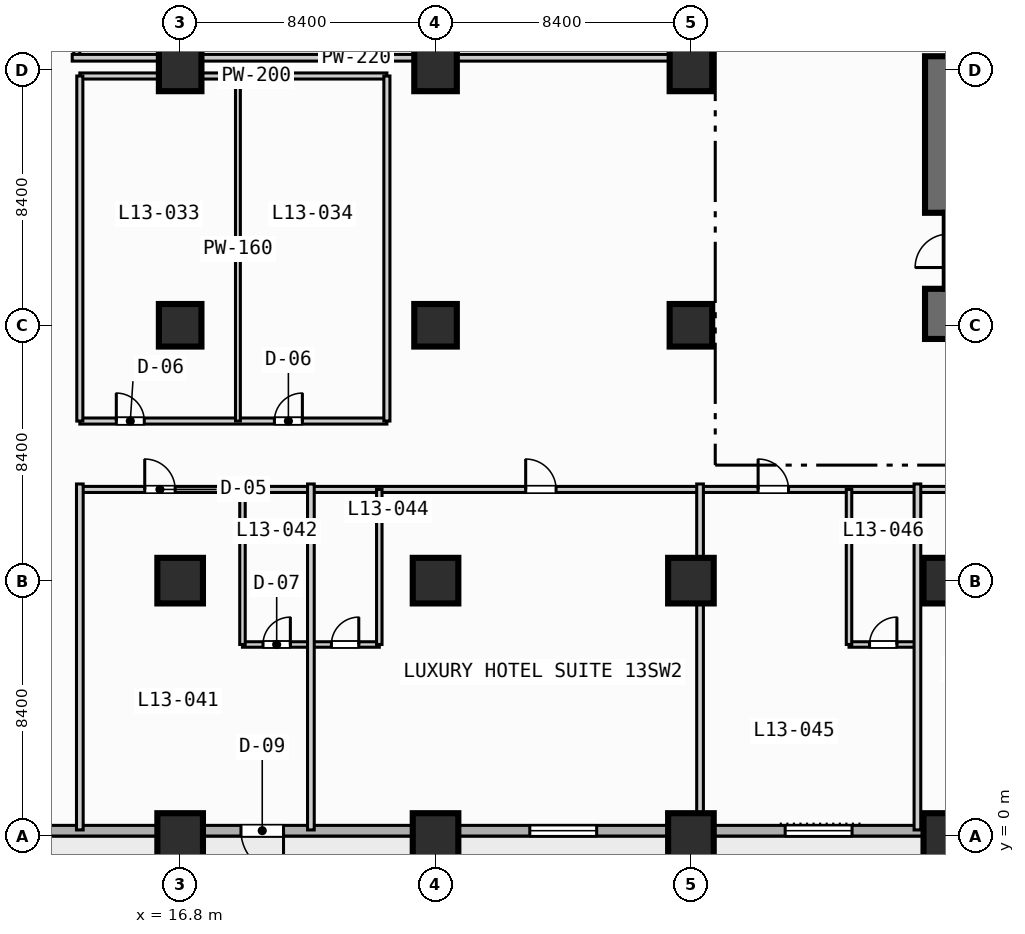
"""IFC4 building model, lengths in metres.
Left out: names, types, materials, properties, quantities, classifications, styles, units other than length and angle.
Written with IfcOpenShell. Run it as: python <this file> out.ifc"""

import sys

from ifc_helpers import new_model, si_unit, direction, frame, frame_2d, origin, origin_2d, place, context, subcontext, project, spatial, rectangle, extrude, element, fill, save


model = new_model("IFC4")
c1 = context("Model", 3, precision=1e-05, world=origin(), true_north=direction((0.0, 1.0)))
c2 = subcontext(c1, "Body", "Model", "MODEL_VIEW")
j1 = project(units=[si_unit("LENGTHUNIT", "METRE"), si_unit("PLANEANGLEUNIT", "RADIAN")], contexts=[c1])
p1 = place(None, origin())
s1 = spatial("IfcSite", under=j1, at=p1, CompositionType="ELEMENT")
p2 = place(p1, origin())
s2 = spatial("IfcBuilding", under=s1, at=p2, CompositionType="ELEMENT")
p3 = place(p2, frame((0.0, 0.0, 58.6)))
s3 = spatial("IfcBuildingStorey", under=s2, at=p3, CompositionType="ELEMENT", Elevation=58.6)
p4 = place(p3, frame((41.75, 16.35, 0.0), z_axis=(0.0, 0.0, 1.0), x_axis=(0.0, 1.0, 0.0)))
e1 = element("IfcWall", 1, at=p4, inside=s3, PredefinedType="SHEAR", context=c2, shape_type="SweptSolid", body=[
    extrude(rectangle(XDim=1.65, YDim=0.9, at=frame_2d((0.825, 0.0))), origin(), (0.0, 0.0, 1.0), 3.55),
])
p5 = place(p3, frame((41.75, 20.5, 0.0), z_axis=(0.0, 0.0, 1.0), x_axis=(0.0, 1.0, 0.0)))
e2 = element("IfcWall", 2, at=p5, inside=s3, PredefinedType="SHEAR", context=c2, shape_type="SweptSolid", body=[
    extrude(rectangle(XDim=5.15, YDim=0.9, at=frame_2d((2.575, 0.0))), origin(), (0.0, 0.0, 1.0), 3.55),
])
for number, where, z_axis, x_axis in (
    (3, (16.8, 0.0, 0.0), (0.0, 0.0, 1.0), (1.0, 0.0, 0.0)),
    (4, (16.8, 8.4, 0.0), (0.0, 0.0, 1.0), (1.0, 0.0, 0.0)),
):
    element("IfcColumn", number, at=place(p3, frame(where, z_axis=z_axis, x_axis=x_axis)), inside=s3, PredefinedType="COLUMN", context=c2, shape_type="SweptSolid", body=[
        extrude(rectangle(XDim=1.5, YDim=1.5, at=origin_2d()), origin(), (0.0, 0.0, 1.0), 3.8),
    ])
for number, where, z_axis, x_axis in (
    (5, (16.8, 16.8, 0.0), (0.0, 0.0, 1.0), (1.0, 0.0, 0.0)),
    (6, (16.8, 25.2, 0.0), (0.0, 0.0, 1.0), (1.0, 0.0, 0.0)),
):
    element("IfcColumn", number, at=place(p3, frame(where, z_axis=z_axis, x_axis=x_axis)), inside=s3, PredefinedType="COLUMN", context=c2, shape_type="SweptSolid", body=[
        extrude(rectangle(XDim=1.4, YDim=1.4, at=origin_2d()), origin(), (0.0, 0.0, 1.0), 3.8),
    ])
for number, where, z_axis, x_axis in (
    (7, (25.2, 0.0, 0.0), (0.0, 0.0, 1.0), (1.0, 0.0, 0.0)),
    (8, (25.2, 8.4, 0.0), (0.0, 0.0, 1.0), (1.0, 0.0, 0.0)),
):
    element("IfcColumn", number, at=place(p3, frame(where, z_axis=z_axis, x_axis=x_axis)), inside=s3, PredefinedType="COLUMN", context=c2, shape_type="SweptSolid", body=[
        extrude(rectangle(XDim=1.5, YDim=1.5, at=origin_2d()), origin(), (0.0, 0.0, 1.0), 3.8),
    ])
for number, where, z_axis, x_axis in (
    (9, (25.2, 16.8, 0.0), (0.0, 0.0, 1.0), (1.0, 0.0, 0.0)),
    (10, (25.2, 25.2, 0.0), (0.0, 0.0, 1.0), (1.0, 0.0, 0.0)),
):
    element("IfcColumn", number, at=place(p3, frame(where, z_axis=z_axis, x_axis=x_axis)), inside=s3, PredefinedType="COLUMN", context=c2, shape_type="SweptSolid", body=[
        extrude(rectangle(XDim=1.4, YDim=1.4, at=origin_2d()), origin(), (0.0, 0.0, 1.0), 3.8),
    ])
for number, where, z_axis, x_axis in (
    (11, (33.6, 0.0, 0.0), (0.0, 0.0, 1.0), (1.0, 0.0, 0.0)),
    (12, (33.6, 8.4, 0.0), (0.0, 0.0, 1.0), (1.0, 0.0, 0.0)),
):
    element("IfcColumn", number, at=place(p3, frame(where, z_axis=z_axis, x_axis=x_axis)), inside=s3, PredefinedType="COLUMN", context=c2, shape_type="SweptSolid", body=[
        extrude(rectangle(XDim=1.5, YDim=1.5, at=origin_2d()), origin(), (0.0, 0.0, 1.0), 3.8),
    ])
for number, where, z_axis, x_axis in (
    (13, (33.6, 16.8, 0.0), (0.0, 0.0, 1.0), (1.0, 0.0, 0.0)),
    (14, (33.6, 25.2, 0.0), (0.0, 0.0, 1.0), (1.0, 0.0, 0.0)),
):
    element("IfcColumn", number, at=place(p3, frame(where, z_axis=z_axis, x_axis=x_axis)), inside=s3, PredefinedType="COLUMN", context=c2, shape_type="SweptSolid", body=[
        extrude(rectangle(XDim=1.4, YDim=1.4, at=origin_2d()), origin(), (0.0, 0.0, 1.0), 3.8),
    ])
for number, where, z_axis, x_axis in (
    (15, (42.0, 0.0, 0.0), (0.0, 0.0, 1.0), (1.0, 0.0, 0.0)),
    (16, (42.0, 8.4, 0.0), (0.0, 0.0, 1.0), (1.0, 0.0, 0.0)),
):
    element("IfcColumn", number, at=place(p3, frame(where, z_axis=z_axis, x_axis=x_axis)), inside=s3, PredefinedType="COLUMN", context=c2, shape_type="SweptSolid", body=[
        extrude(rectangle(XDim=1.5, YDim=1.5, at=origin_2d()), origin(), (0.0, 0.0, 1.0), 3.8),
    ])
p6 = place(p3, frame((89.225, 0.175, 0.0), z_axis=(0.0, 0.0, 1.0), x_axis=(-1.0, 0.0, 0.0)))
e17 = element("IfcWall", 17, at=p6, inside=s3, PredefinedType="STANDARD", context=c2, shape_type="SweptSolid", body=[
    extrude(rectangle(XDim=86.05, YDim=0.35, at=frame_2d((43.025, 0.0))), origin(), (0.0, 0.0, 1.0), 3.55),
])
p7 = place(p6, frame((69.025, 0.0, 0.0)))
e18 = element("IfcOpeningElement", 18, at=p7, cuts=e17, PredefinedType="OPENING", context=c2, shape_type="SweptSolid", body=[
    extrude(rectangle(XDim=1.4, YDim=2.2, at=frame_2d((0.7, 1.1))), frame((0.0, 0.185, 0.0), z_axis=(0.0, -1.0, 0.0), x_axis=(1.0, 0.0, 0.0)), (0.0, 0.0, 1.0), 0.37),
])
p8 = place(p6, frame((58.725, 0.0, 0.85)))
e19 = element("IfcOpeningElement", 19, at=p8, cuts=e17, PredefinedType="OPENING", context=c2, shape_type="SweptSolid", body=[
    extrude(rectangle(XDim=2.2, YDim=1.8, at=frame_2d((1.1, 0.9))), frame((0.0, 0.185, 0.0), z_axis=(0.0, -1.0, 0.0), x_axis=(1.0, 0.0, 0.0)), (0.0, 0.0, 1.0), 0.37),
])
p9 = place(p6, frame((50.325, 0.0, 0.85)))
e20 = element("IfcOpeningElement", 20, at=p9, cuts=e17, PredefinedType="OPENING", context=c2, shape_type="SweptSolid", body=[
    extrude(rectangle(XDim=2.2, YDim=1.8, at=frame_2d((1.1, 0.9))), frame((0.0, 0.185, 0.0), z_axis=(0.0, -1.0, 0.0), x_axis=(1.0, 0.0, 0.0)), (0.0, 0.0, 1.0), 0.37),
])
p10 = place(p6, frame((41.925, 0.0, 0.85)))
e21 = element("IfcOpeningElement", 21, at=p10, cuts=e17, PredefinedType="OPENING", context=c2, shape_type="SweptSolid", body=[
    extrude(rectangle(XDim=2.2, YDim=1.8, at=frame_2d((1.1, 0.9))), frame((0.0, 0.185, 0.0), z_axis=(0.0, -1.0, 0.0), x_axis=(1.0, 0.0, 0.0)), (0.0, 0.0, 1.0), 0.37),
])
p11 = place(p6, frame((27.775, 0.0, 0.85)))
e22 = element("IfcOpeningElement", 22, at=p11, cuts=e17, PredefinedType="OPENING", context=c2, shape_type="SweptSolid", body=[
    extrude(rectangle(XDim=1.8, YDim=1.8, at=frame_2d((0.9, 0.9))), frame((0.0, 0.185, 0.0), z_axis=(0.0, -1.0, 0.0), x_axis=(1.0, 0.0, 0.0)), (0.0, 0.0, 1.0), 0.37),
])
p12 = place(p3, frame((42.075, 18.0, 0.0), z_axis=(0.0, 0.0, 1.0), x_axis=(0.0, 1.0, 0.0)))
e23 = element("IfcWall", 23, at=p12, inside=s3, PredefinedType="SOLIDWALL", context=c2, shape_type="SweptSolid", body=[
    extrude(rectangle(XDim=2.5, YDim=0.25, at=frame_2d((1.25, 0.0))), origin(), (0.0, 0.0, 1.0), 3.55),
])
p13 = place(p12, frame((0.7, 0.0, 0.0)))
e24 = element("IfcOpeningElement", 24, at=p13, cuts=e23, PredefinedType="OPENING", context=c2, shape_type="SweptSolid", body=[
    extrude(rectangle(XDim=1.1, YDim=2.15, at=frame_2d((0.55, 1.075))), frame((0.0, 0.135, 0.0), z_axis=(0.0, -1.0, 0.0), x_axis=(1.0, 0.0, 0.0)), (0.0, 0.0, 1.0), 0.27),
])
p14 = place(p3, frame((13.5, 13.65, 0.0), z_axis=(0.0, 0.0, 1.0), x_axis=(1.0, 0.0, 0.0)))
e25 = element("IfcWall", 25, at=p14, inside=s3, PredefinedType="PARTITIONING", context=c2, shape_type="SweptSolid", body=[
    extrude(rectangle(XDim=10.1, YDim=0.2, at=frame_2d((5.05, 0.0))), origin(), (0.0, 0.0, 1.0), 3.55),
])
p15 = place(p14, frame((1.2, 0.0, 0.0)))
e26 = element("IfcOpeningElement", 26, at=p15, cuts=e25, PredefinedType="OPENING", context=c2, shape_type="SweptSolid", body=[
    extrude(rectangle(XDim=0.92, YDim=2.1, at=frame_2d((0.46, 1.05))), frame((0.0, 0.11, 0.0), z_axis=(0.0, -1.0, 0.0), x_axis=(1.0, 0.0, 0.0)), (0.0, 0.0, 1.0), 0.22),
])
p16 = place(p14, frame((6.4, 0.0, 0.0)))
e27 = element("IfcOpeningElement", 27, at=p16, cuts=e25, PredefinedType="OPENING", context=c2, shape_type="SweptSolid", body=[
    extrude(rectangle(XDim=0.92, YDim=2.1, at=frame_2d((0.46, 1.05))), frame((0.0, 0.11, 0.0), z_axis=(0.0, -1.0, 0.0), x_axis=(1.0, 0.0, 0.0)), (0.0, 0.0, 1.0), 0.22),
])
p17 = place(p3, frame((18.7, 13.65, 0.0), z_axis=(0.0, 0.0, 1.0), x_axis=(0.0, 1.0, 0.0)))
e28 = element("IfcWall", 28, at=p17, inside=s3, PredefinedType="PARTITIONING", context=c2, shape_type="SweptSolid", body=[
    extrude(rectangle(XDim=11.35, YDim=0.16, at=frame_2d((5.675, 0.0))), origin(), (0.0, 0.0, 1.0), 3.55),
])
p18 = place(p3, frame((13.5, 25.0, 0.0), z_axis=(0.0, 0.0, 1.0), x_axis=(1.0, 0.0, 0.0)))
e29 = element("IfcWall", 29, at=p18, inside=s3, PredefinedType="PARTITIONING", context=c2, shape_type="SweptSolid", body=[
    extrude(rectangle(XDim=10.1, YDim=0.2, at=frame_2d((5.05, 0.0))), origin(), (0.0, 0.0, 1.0), 2.8),
])
for number, where, z_axis, x_axis in (
    (30, (13.5, 13.65, 0.0), (0.0, 0.0, 1.0), (0.0, 1.0, 0.0)),
    (31, (23.6, 13.65, 0.0), (0.0, 0.0, 1.0), (0.0, 1.0, 0.0)),
):
    element("IfcWall", number, at=place(p3, frame(where, z_axis=z_axis, x_axis=x_axis)), inside=s3, PredefinedType="PARTITIONING", context=c2, shape_type="SweptSolid", body=[
        extrude(rectangle(XDim=11.35, YDim=0.2, at=frame_2d((5.675, 0.0))), origin(), (0.0, 0.0, 1.0), 3.55),
    ])
p19 = place(p3, frame((13.4, 25.6, 0.0), z_axis=(0.0, 0.0, 1.0), x_axis=(0.0, 1.0, 0.0)))
e32 = element("IfcWall", 32, at=p19, inside=s3, PredefinedType="PARTITIONING", context=c2, shape_type="SweptSolid", body=[
    extrude(rectangle(XDim=13.6, YDim=0.2, at=frame_2d((6.8, 0.0))), origin(), (0.0, 0.0, 1.0), 3.55),
])
p20 = place(p19, frame((1.735, 0.0, 0.0)))
e33 = element("IfcOpeningElement", 33, at=p20, cuts=e32, PredefinedType="OPENING", context=c2, shape_type="SweptSolid", body=[
    extrude(rectangle(XDim=1.0, YDim=2.15, at=frame_2d((0.5, 1.075))), frame((0.0, 0.11, 0.0), z_axis=(0.0, -1.0, 0.0), x_axis=(1.0, 0.0, 0.0)), (0.0, 0.0, 1.0), 0.22),
])
p21 = place(p19, frame((8.535, 0.0, 0.0)))
e34 = element("IfcOpeningElement", 34, at=p21, cuts=e32, PredefinedType="OPENING", context=c2, shape_type="SweptSolid", body=[
    extrude(rectangle(XDim=1.0, YDim=2.15, at=frame_2d((0.5, 1.075))), frame((0.0, 0.11, 0.0), z_axis=(0.0, -1.0, 0.0), x_axis=(1.0, 0.0, 0.0)), (0.0, 0.0, 1.0), 0.22),
])
p22 = place(p3, frame((13.25, 25.6, 0.0), z_axis=(0.0, 0.0, 1.0), x_axis=(1.0, 0.0, 0.0)))
e35 = element("IfcWall", 35, at=p22, inside=s3, PredefinedType="PARTITIONING", context=c2, shape_type="SweptSolid", body=[
    extrude(rectangle(XDim=20.18, YDim=0.22, at=frame_2d((10.09, 0.0))), origin(), (0.0, 0.0, 1.0), 3.55),
])
p23 = place(p3, frame((13.5, 11.4, 0.0), z_axis=(0.0, 0.0, 1.0), x_axis=(1.0, 0.0, 0.0)))
e36 = element("IfcWall", 36, at=p23, inside=s3, PredefinedType="PARTITIONING", context=c2, shape_type="SweptSolid", body=[
    extrude(rectangle(XDim=50.3, YDim=0.2, at=frame_2d((25.15, 0.0))), origin(), (0.0, 0.0, 1.0), 3.55),
])
p24 = place(p23, frame((2.135, 0.0, 0.0)))
e37 = element("IfcOpeningElement", 37, at=p24, cuts=e36, PredefinedType="OPENING", context=c2, shape_type="SweptSolid", body=[
    extrude(rectangle(XDim=1.0, YDim=2.15, at=frame_2d((0.5, 1.075))), frame((0.0, 0.11, 0.0), z_axis=(0.0, -1.0, 0.0), x_axis=(1.0, 0.0, 0.0)), (0.0, 0.0, 1.0), 0.22),
])
p25 = place(p23, frame((14.665, 0.0, 0.0)))
e38 = element("IfcOpeningElement", 38, at=p25, cuts=e36, PredefinedType="OPENING", context=c2, shape_type="SweptSolid", body=[
    extrude(rectangle(XDim=1.0, YDim=2.15, at=frame_2d((0.5, 1.075))), frame((0.0, 0.11, 0.0), z_axis=(0.0, -1.0, 0.0), x_axis=(1.0, 0.0, 0.0)), (0.0, 0.0, 1.0), 0.22),
])
p26 = place(p23, frame((22.31, 0.0, 0.0)))
e39 = element("IfcOpeningElement", 39, at=p26, cuts=e36, PredefinedType="OPENING", context=c2, shape_type="SweptSolid", body=[
    extrude(rectangle(XDim=1.0, YDim=2.15, at=frame_2d((0.5, 1.075))), frame((0.0, 0.11, 0.0), z_axis=(0.0, -1.0, 0.0), x_axis=(1.0, 0.0, 0.0)), (0.0, 0.0, 1.0), 0.22),
])
p27 = place(p23, frame((32.51, 0.0, 0.0)))
e40 = element("IfcOpeningElement", 40, at=p27, cuts=e36, PredefinedType="OPENING", context=c2, shape_type="SweptSolid", body=[
    extrude(rectangle(XDim=1.0, YDim=2.15, at=frame_2d((0.5, 1.075))), frame((0.0, 0.11, 0.0), z_axis=(0.0, -1.0, 0.0), x_axis=(1.0, 0.0, 0.0)), (0.0, 0.0, 1.0), 0.22),
])
p28 = place(p23, frame((43.885, 0.0, 0.0)))
e41 = element("IfcOpeningElement", 41, at=p28, cuts=e36, PredefinedType="OPENING", context=c2, shape_type="SweptSolid", body=[
    extrude(rectangle(XDim=1.0, YDim=2.15, at=frame_2d((0.5, 1.075))), frame((0.0, 0.11, 0.0), z_axis=(0.0, -1.0, 0.0), x_axis=(1.0, 0.0, 0.0)), (0.0, 0.0, 1.0), 0.22),
])
p29 = place(p3, frame((13.5, 0.2, 0.0), z_axis=(0.0, 0.0, 1.0), x_axis=(0.0, 1.0, 0.0)))
e42 = element("IfcWall", 42, at=p29, inside=s3, PredefinedType="PARTITIONING", context=c2, shape_type="SweptSolid", body=[
    extrude(rectangle(XDim=11.38, YDim=0.22, at=frame_2d((5.69, 0.0))), origin(), (0.0, 0.0, 1.0), 3.55),
])
p30 = place(p3, frame((18.85, 6.3, 0.0), z_axis=(0.0, 0.0, 1.0), x_axis=(1.0, 0.0, 0.0)))
e43 = element("IfcWall", 43, at=p30, inside=s3, PredefinedType="PLUMBINGWALL", context=c2, shape_type="SweptSolid", body=[
    extrude(rectangle(XDim=4.5, YDim=0.18, at=frame_2d((2.25, 0.0))), origin(), (0.0, 0.0, 1.0), 3.55),
])
p31 = place(p30, frame((0.675, 0.0, 0.0)))
e44 = element("IfcOpeningElement", 44, at=p31, cuts=e43, PredefinedType="OPENING", context=c2, shape_type="SweptSolid", body=[
    extrude(rectangle(XDim=0.9, YDim=2.1, at=frame_2d((0.45, 1.05))), frame((0.0, 0.1, 0.0), z_axis=(0.0, -1.0, 0.0), x_axis=(1.0, 0.0, 0.0)), (0.0, 0.0, 1.0), 0.2),
])
p32 = place(p30, frame((2.925, 0.0, 0.0)))
e45 = element("IfcOpeningElement", 45, at=p32, cuts=e43, PredefinedType="OPENING", context=c2, shape_type="SweptSolid", body=[
    extrude(rectangle(XDim=0.9, YDim=2.1, at=frame_2d((0.45, 1.05))), frame((0.0, 0.1, 0.0), z_axis=(0.0, -1.0, 0.0), x_axis=(1.0, 0.0, 0.0)), (0.0, 0.0, 1.0), 0.2),
])
p33 = place(p3, frame((18.85, 6.3, 0.0), z_axis=(0.0, 0.0, 1.0), x_axis=(0.0, 1.0, 0.0)))
e46 = element("IfcWall", 46, at=p33, inside=s3, PredefinedType="PLUMBINGWALL", context=c2, shape_type="SweptSolid", body=[
    extrude(rectangle(XDim=5.1, YDim=0.18, at=frame_2d((2.55, 0.0))), origin(), (0.0, 0.0, 1.0), 3.55),
])
p34 = place(p3, frame((21.1, 0.2, 0.0), z_axis=(0.0, 0.0, 1.0), x_axis=(0.0, 1.0, 0.0)))
e47 = element("IfcWall", 47, at=p34, inside=s3, PredefinedType="PARTITIONING", context=c2, shape_type="SweptSolid", body=[
    extrude(rectangle(XDim=11.38, YDim=0.22, at=frame_2d((5.69, 0.0))), origin(), (0.0, 0.0, 1.0), 3.55),
])
p35 = place(p3, frame((23.35, 6.3, 0.0), z_axis=(0.0, 0.0, 1.0), x_axis=(0.0, 1.0, 0.0)))
e48 = element("IfcWall", 48, at=p35, inside=s3, PredefinedType="PLUMBINGWALL", context=c2, shape_type="SweptSolid", body=[
    extrude(rectangle(XDim=5.1, YDim=0.18, at=frame_2d((2.55, 0.0))), origin(), (0.0, 0.0, 1.0), 3.55),
])
p36 = place(p3, frame((33.9, 0.2, 0.0), z_axis=(0.0, 0.0, 1.0), x_axis=(0.0, 1.0, 0.0)))
e49 = element("IfcWall", 49, at=p36, inside=s3, PredefinedType="PARTITIONING", context=c2, shape_type="SweptSolid", body=[
    extrude(rectangle(XDim=11.38, YDim=0.22, at=frame_2d((5.69, 0.0))), origin(), (0.0, 0.0, 1.0), 2.8),
])
p37 = place(p3, frame((38.8, 6.3, 0.0), z_axis=(0.0, 0.0, 1.0), x_axis=(1.0, 0.0, 0.0)))
e50 = element("IfcWall", 50, at=p37, inside=s3, PredefinedType="PLUMBINGWALL", context=c2, shape_type="SweptSolid", body=[
    extrude(rectangle(XDim=2.25, YDim=0.18, at=frame_2d((1.125, 0.0))), origin(), (0.0, 0.0, 1.0), 3.55),
])
p38 = place(p37, frame((0.675, 0.0, 0.0)))
e51 = element("IfcOpeningElement", 51, at=p38, cuts=e50, PredefinedType="OPENING", context=c2, shape_type="SweptSolid", body=[
    extrude(rectangle(XDim=0.9, YDim=2.1, at=frame_2d((0.45, 1.05))), frame((0.0, 0.1, 0.0), z_axis=(0.0, -1.0, 0.0), x_axis=(1.0, 0.0, 0.0)), (0.0, 0.0, 1.0), 0.2),
])
p39 = place(p3, frame((38.8, 6.3, 0.0), z_axis=(0.0, 0.0, 1.0), x_axis=(0.0, 1.0, 0.0)))
e52 = element("IfcWall", 52, at=p39, inside=s3, PredefinedType="PLUMBINGWALL", context=c2, shape_type="SweptSolid", body=[
    extrude(rectangle(XDim=5.1, YDim=0.18, at=frame_2d((2.55, 0.0))), origin(), (0.0, 0.0, 1.0), 3.55),
])
p40 = place(p3, frame((41.05, 0.2, 0.0), z_axis=(0.0, 0.0, 1.0), x_axis=(0.0, 1.0, 0.0)))
e53 = element("IfcWall", 53, at=p40, inside=s3, PredefinedType="PARTITIONING", context=c2, shape_type="SweptSolid", body=[
    extrude(rectangle(XDim=11.38, YDim=0.22, at=frame_2d((5.69, 0.0))), origin(), (0.0, 0.0, 1.0), 3.55),
])
p41 = place(p7, origin())
e54 = element("IfcDoor", 54, at=p41, inside=s3, OperationType="SINGLE_SWING_LEFT", PredefinedType="DOOR", context=c2, shape_type="SweptSolid", body=[
    extrude(rectangle(XDim=1.4, YDim=2.2, at=frame_2d((0.7, 1.1))), frame((0.0, 0.025, 0.0), z_axis=(0.0, -1.0, 0.0), x_axis=(1.0, 0.0, 0.0)), (0.0, 0.0, 1.0), 0.05),
])
fill(e18, e54)
p42 = place(p8, origin())
e55 = element("IfcWindow", 55, at=p42, inside=s3, PartitioningType="SINGLE_PANEL", PredefinedType="WINDOW", context=c2, shape_type="SweptSolid", body=[
    extrude(rectangle(XDim=2.2, YDim=1.8, at=frame_2d((1.1, 0.9))), frame((0.0, 0.03, 0.0), z_axis=(0.0, -1.0, 0.0), x_axis=(1.0, 0.0, 0.0)), (0.0, 0.0, 1.0), 0.06),
])
fill(e19, e55)
p43 = place(p9, origin())
e56 = element("IfcWindow", 56, at=p43, inside=s3, PartitioningType="SINGLE_PANEL", PredefinedType="WINDOW", context=c2, shape_type="SweptSolid", body=[
    extrude(rectangle(XDim=2.2, YDim=1.8, at=frame_2d((1.1, 0.9))), frame((0.0, 0.03, 0.0), z_axis=(0.0, -1.0, 0.0), x_axis=(1.0, 0.0, 0.0)), (0.0, 0.0, 1.0), 0.06),
])
fill(e20, e56)
p44 = place(p15, origin())
e57 = element("IfcDoor", 57, at=p44, inside=s3, OperationType="SINGLE_SWING_LEFT", PredefinedType="DOOR", context=c2, shape_type="SweptSolid", body=[
    extrude(rectangle(XDim=0.92, YDim=2.1, at=frame_2d((0.46, 1.05))), frame((0.0, 0.025, 0.0), z_axis=(0.0, -1.0, 0.0), x_axis=(1.0, 0.0, 0.0)), (0.0, 0.0, 1.0), 0.05),
])
fill(e26, e57)
p45 = place(p16, origin())
e58 = element("IfcDoor", 58, at=p45, inside=s3, OperationType="SINGLE_SWING_RIGHT", PredefinedType="DOOR", context=c2, shape_type="SweptSolid", body=[
    extrude(rectangle(XDim=0.92, YDim=2.1, at=frame_2d((0.46, 1.05))), frame((0.0, 0.025, 0.0), z_axis=(0.0, -1.0, 0.0), x_axis=(1.0, 0.0, 0.0)), (0.0, 0.0, 1.0), 0.05),
])
fill(e27, e58)
p46 = place(p24, origin())
e59 = element("IfcDoor", 59, at=p46, inside=s3, OperationType="SINGLE_SWING_LEFT", PredefinedType="DOOR", context=c2, shape_type="SweptSolid", body=[
    extrude(rectangle(XDim=1.0, YDim=2.15, at=frame_2d((0.5, 1.075))), frame((0.0, 0.025, 0.0), z_axis=(0.0, -1.0, 0.0), x_axis=(1.0, 0.0, 0.0)), (0.0, 0.0, 1.0), 0.05),
])
fill(e37, e59)
p47 = place(p25, origin())
e60 = element("IfcDoor", 60, at=p47, inside=s3, OperationType="SINGLE_SWING_LEFT", PredefinedType="DOOR", context=c2, shape_type="SweptSolid", body=[
    extrude(rectangle(XDim=1.0, YDim=2.15, at=frame_2d((0.5, 1.075))), frame((0.0, 0.025, 0.0), z_axis=(0.0, -1.0, 0.0), x_axis=(1.0, 0.0, 0.0)), (0.0, 0.0, 1.0), 0.05),
])
fill(e38, e60)
p48 = place(p26, origin())
e61 = element("IfcDoor", 61, at=p48, inside=s3, OperationType="SINGLE_SWING_LEFT", PredefinedType="DOOR", context=c2, shape_type="SweptSolid", body=[
    extrude(rectangle(XDim=1.0, YDim=2.15, at=frame_2d((0.5, 1.075))), frame((0.0, 0.025, 0.0), z_axis=(0.0, -1.0, 0.0), x_axis=(1.0, 0.0, 0.0)), (0.0, 0.0, 1.0), 0.05),
])
fill(e39, e61)
p49 = place(p31, origin())
e62 = element("IfcDoor", 62, at=p49, inside=s3, OperationType="SINGLE_SWING_RIGHT", PredefinedType="DOOR", context=c2, shape_type="SweptSolid", body=[
    extrude(rectangle(XDim=0.9, YDim=2.1, at=frame_2d((0.45, 1.05))), frame((0.0, 0.025, 0.0), z_axis=(0.0, -1.0, 0.0), x_axis=(1.0, 0.0, 0.0)), (0.0, 0.0, 1.0), 0.05),
])
fill(e44, e62)
p50 = place(p32, origin())
e63 = element("IfcDoor", 63, at=p50, inside=s3, OperationType="SINGLE_SWING_RIGHT", PredefinedType="DOOR", context=c2, shape_type="SweptSolid", body=[
    extrude(rectangle(XDim=0.9, YDim=2.1, at=frame_2d((0.45, 1.05))), frame((0.0, 0.025, 0.0), z_axis=(0.0, -1.0, 0.0), x_axis=(1.0, 0.0, 0.0)), (0.0, 0.0, 1.0), 0.05),
])
fill(e45, e63)
p51 = place(p38, origin())
e64 = element("IfcDoor", 64, at=p51, inside=s3, OperationType="SINGLE_SWING_RIGHT", PredefinedType="DOOR", context=c2, shape_type="SweptSolid", body=[
    extrude(rectangle(XDim=0.9, YDim=2.1, at=frame_2d((0.45, 1.05))), frame((0.0, 0.025, 0.0), z_axis=(0.0, -1.0, 0.0), x_axis=(1.0, 0.0, 0.0)), (0.0, 0.0, 1.0), 0.05),
])
fill(e51, e64)
save(model, sys.argv[1])
